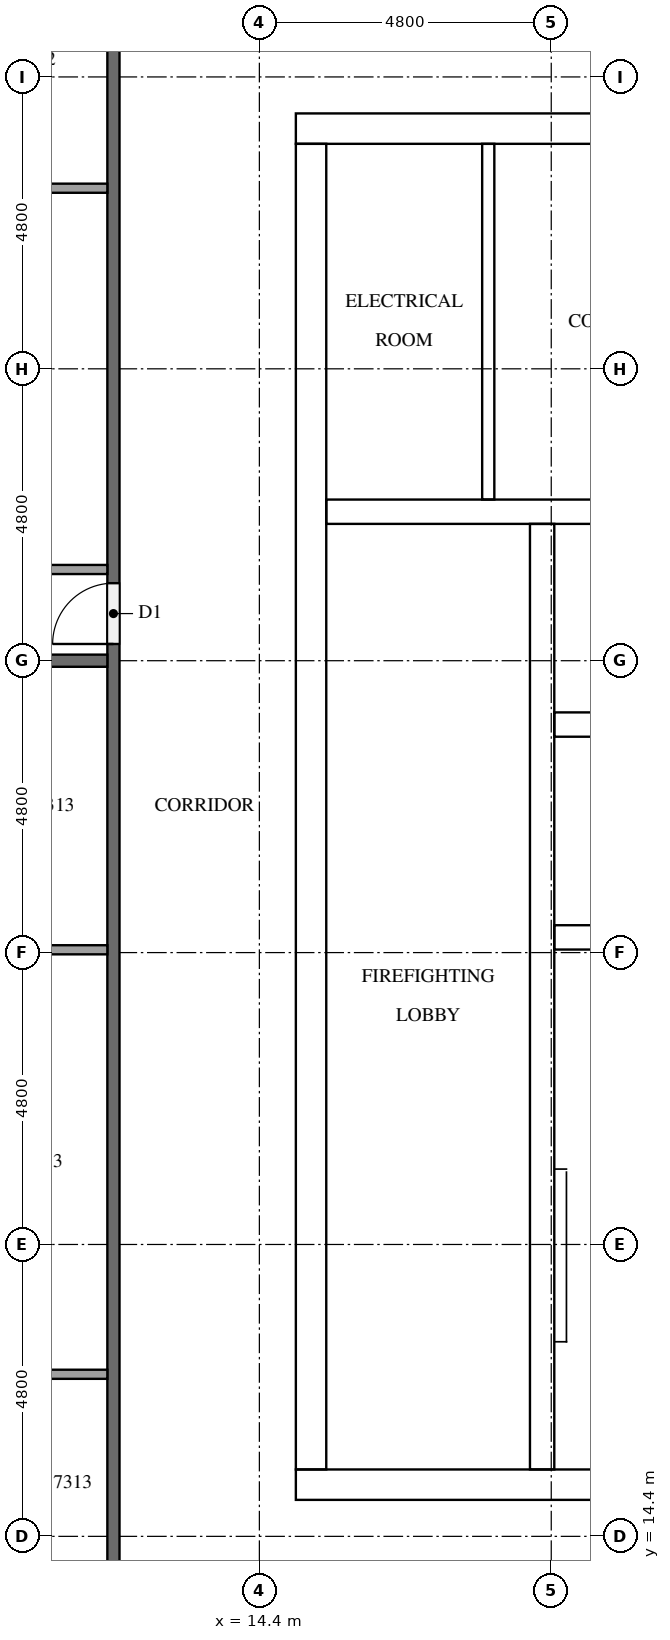
"""IFC4 building model, lengths in metres.
Left out: names, types, materials, properties, quantities, classifications, styles, units other than length and angle.
Written with IfcOpenShell. Run it as: python <this file> out.ifc"""

import sys

from ifc_helpers import new_model, si_unit, direction, frame, frame_2d, origin, place, context, subcontext, project, spatial, rectangle, extrude, element, fill, save


model = new_model("IFC4")
c1 = context("Model", 3, precision=1e-05, world=origin(), true_north=direction((0.0, 1.0)))
c2 = subcontext(c1, "Body", "Model", "MODEL_VIEW")
j1 = project(units=[si_unit("LENGTHUNIT", "METRE"), si_unit("PLANEANGLEUNIT", "RADIAN")], contexts=[c1])
p1 = place(None, origin())
s1 = spatial("IfcSite", under=j1, at=p1, CompositionType="ELEMENT")
p2 = place(p1, origin())
s2 = spatial("IfcBuilding", under=s1, at=p2, CompositionType="ELEMENT")
p3 = place(p2, frame((0.0, 0.0, 279.1)))
s3 = spatial("IfcBuildingStorey", under=s2, at=p3, CompositionType="ELEMENT", Elevation=279.1)
p4 = place(p3, frame((15.0, 15.25, 0.0), z_axis=(0.0, 0.0, 1.0), x_axis=(1.0, 0.0, 0.0)))
e1 = element("IfcWall", 1, at=p4, inside=s3, PredefinedType="SHEAR", context=c2, shape_type="SweptSolid", body=[
    extrude(rectangle(XDim=32.4, YDim=0.5, at=frame_2d((16.2, 0.0))), origin(), (0.0, 0.0, 1.0), 3.2),
])
p5 = place(p4, frame((15.3, 0.0, 0.0)))
e2 = element("IfcOpeningElement", 2, at=p5, cuts=e1, PredefinedType="OPENING", context=c2, shape_type="SweptSolid", body=[
    extrude(rectangle(XDim=1.8, YDim=2.1, at=frame_2d((0.9, 1.05))), frame((0.0, 0.26, 0.0), z_axis=(0.0, -1.0, 0.0), x_axis=(1.0, 0.0, 0.0)), (0.0, 0.0, 1.0), 0.52),
])
p6 = place(p3, frame((15.0, 37.55, 0.0), z_axis=(0.0, 0.0, 1.0), x_axis=(1.0, 0.0, 0.0)))
e3 = element("IfcWall", 3, at=p6, inside=s3, PredefinedType="SHEAR", context=c2, shape_type="SweptSolid", body=[
    extrude(rectangle(XDim=32.4, YDim=0.5, at=frame_2d((16.2, 0.0))), origin(), (0.0, 0.0, 1.0), 3.2),
])
p7 = place(p6, frame((15.3, 0.0, 0.0)))
e4 = element("IfcOpeningElement", 4, at=p7, cuts=e3, PredefinedType="OPENING", context=c2, shape_type="SweptSolid", body=[
    extrude(rectangle(XDim=1.8, YDim=2.1, at=frame_2d((0.9, 1.05))), frame((0.0, 0.26, 0.0), z_axis=(0.0, -1.0, 0.0), x_axis=(1.0, 0.0, 0.0)), (0.0, 0.0, 1.0), 0.52),
])
p8 = place(p6, frame((1.282, 0.0, 0.0)))
e5 = element("IfcOpeningElement", 5, at=p8, cuts=e3, PredefinedType="OPENING", context=c2, shape_type="SweptSolid", body=[
    extrude(rectangle(XDim=1.0, YDim=2.1, at=frame_2d((0.5, 1.05))), frame((0.0, 0.26, 0.0), z_axis=(0.0, -1.0, 0.0), x_axis=(1.0, 0.0, 0.0)), (0.0, 0.0, 1.0), 0.52),
])
p9 = place(p6, frame((5.082, 0.0, 0.0)))
e6 = element("IfcOpeningElement", 6, at=p9, cuts=e3, PredefinedType="OPENING", context=c2, shape_type="SweptSolid", body=[
    extrude(rectangle(XDim=1.0, YDim=2.1, at=frame_2d((0.5, 1.05))), frame((0.0, 0.26, 0.0), z_axis=(0.0, -1.0, 0.0), x_axis=(1.0, 0.0, 0.0)), (0.0, 0.0, 1.0), 0.52),
])
p10 = place(p3, frame((15.25, 15.5, 0.0), z_axis=(0.0, 0.0, 1.0), x_axis=(0.0, 1.0, 0.0)))
e7 = element("IfcWall", 7, at=p10, inside=s3, PredefinedType="SHEAR", context=c2, shape_type="SweptSolid", body=[
    extrude(rectangle(XDim=21.8, YDim=0.5, at=frame_2d((10.9, 0.0))), origin(), (0.0, 0.0, 1.0), 3.2),
])
p11 = place(p10, frame((5.26, 0.0, 0.0)))
e8 = element("IfcOpeningElement", 8, at=p11, cuts=e7, PredefinedType="OPENING", context=c2, shape_type="SweptSolid", body=[
    extrude(rectangle(XDim=1.2, YDim=2.1, at=frame_2d((0.6, 1.05))), frame((0.0, 0.26, 0.0), z_axis=(0.0, -1.0, 0.0), x_axis=(1.0, 0.0, 0.0)), (0.0, 0.0, 1.0), 0.52),
])
p12 = place(p3, frame((19.05, 15.5, 0.0), z_axis=(0.0, 0.0, 1.0), x_axis=(0.0, 1.0, 0.0)))
e9 = element("IfcWall", 9, at=p12, inside=s3, PredefinedType="SHEAR", context=c2, shape_type="SweptSolid", body=[
    extrude(rectangle(XDim=15.55, YDim=0.4, at=frame_2d((7.775, 0.0))), origin(), (0.0, 0.0, 1.0), 3.2),
])
p13 = place(p12, frame((9.95, 0.0, 0.0)))
e10 = element("IfcOpeningElement", 10, at=p13, cuts=e9, PredefinedType="OPENING", context=c2, shape_type="SweptSolid", body=[
    extrude(rectangle(XDim=1.1, YDim=2.1, at=frame_2d((0.55, 1.05))), frame((0.0, 0.21, 0.0), z_axis=(0.0, -1.0, 0.0), x_axis=(1.0, 0.0, 0.0)), (0.0, 0.0, 1.0), 0.42),
])
p14 = place(p12, frame((13.45, 0.0, 0.0)))
e11 = element("IfcOpeningElement", 11, at=p14, cuts=e9, PredefinedType="OPENING", context=c2, shape_type="SweptSolid", body=[
    extrude(rectangle(XDim=1.1, YDim=2.1, at=frame_2d((0.55, 1.05))), frame((0.0, 0.21, 0.0), z_axis=(0.0, -1.0, 0.0), x_axis=(1.0, 0.0, 0.0)), (0.0, 0.0, 1.0), 0.42),
])
p15 = place(p12, frame((0.7, 0.0, 0.0)))
e12 = element("IfcOpeningElement", 12, at=p15, cuts=e9, PredefinedType="OPENING", context=c2, shape_type="SweptSolid", body=[
    extrude(rectangle(XDim=1.2, YDim=2.1, at=frame_2d((0.6, 1.05))), frame((0.0, 0.21, 0.0), z_axis=(0.0, -1.0, 0.0), x_axis=(1.0, 0.0, 0.0)), (0.0, 0.0, 1.0), 0.42),
])
for number, where, z_axis, x_axis in (
    (13, (19.25, 24.25, 0.0), (0.0, 0.0, 1.0), (1.0, 0.0, 0.0)),
    (14, (19.25, 27.75, 0.0), (0.0, 0.0, 1.0), (1.0, 0.0, 0.0)),
):
    element("IfcWall", number, at=place(p3, frame(where, z_axis=z_axis, x_axis=x_axis)), inside=s3, PredefinedType="SHEAR", context=c2, shape_type="SweptSolid", body=[
        extrude(rectangle(XDim=3.65, YDim=0.4, at=frame_2d((1.825, 0.0))), origin(), (0.0, 0.0, 1.0), 3.2),
    ])
p16 = place(p3, frame((15.5, 31.25, 0.0), z_axis=(0.0, 0.0, 1.0), x_axis=(1.0, 0.0, 0.0)))
e15 = element("IfcWall", 15, at=p16, inside=s3, PredefinedType="SHEAR", context=c2, shape_type="SweptSolid", body=[
    extrude(rectangle(XDim=7.4, YDim=0.4, at=frame_2d((3.7, 0.0))), origin(), (0.0, 0.0, 1.0), 3.2),
])
p17 = place(p3, frame((18.164, 31.45, 0.0), z_axis=(0.0, 0.0, 1.0), x_axis=(0.0, 1.0, 0.0)))
e16 = element("IfcWall", 16, at=p17, inside=s3, PredefinedType="PARTITIONING", context=c2, shape_type="SweptSolid", body=[
    extrude(rectangle(XDim=5.85, YDim=0.2, at=frame_2d((2.925, 0.0))), origin(), (0.0, 0.0, 1.0), 3.2),
])
p18 = place(p3, frame((12.0, 12.1, 0.0), z_axis=(0.0, 0.0, 1.0), x_axis=(0.0, 1.0, 0.0)))
e17 = element("IfcWall", 17, at=p18, inside=s3, PredefinedType="PARTITIONING", context=c2, shape_type="SweptSolid", body=[
    extrude(rectangle(XDim=28.6, YDim=0.2, at=frame_2d((14.3, 0.0))), origin(), (0.0, 0.0, 1.0), 3.2),
])
p19 = place(p18, frame((16.975, 0.0, 0.0)))
e18 = element("IfcOpeningElement", 18, at=p19, cuts=e17, PredefinedType="OPENING", context=c2, shape_type="SweptSolid", body=[
    extrude(rectangle(XDim=1.0, YDim=2.1, at=frame_2d((0.5, 1.05))), frame((0.0, 0.11, 0.0), z_axis=(0.0, -1.0, 0.0), x_axis=(1.0, 0.0, 0.0)), (0.0, 0.0, 1.0), 0.22),
])
p20 = place(p18, frame((0.175, 0.0, 0.0)))
e19 = element("IfcOpeningElement", 19, at=p20, cuts=e17, PredefinedType="OPENING", context=c2, shape_type="SweptSolid", body=[
    extrude(rectangle(XDim=1.0, YDim=2.1, at=frame_2d((0.5, 1.05))), frame((0.0, 0.11, 0.0), z_axis=(0.0, -1.0, 0.0), x_axis=(1.0, 0.0, 0.0)), (0.0, 0.0, 1.0), 0.22),
])
p21 = place(p3, frame((0.1, 28.8, 0.0), z_axis=(0.0, 0.0, 1.0), x_axis=(1.0, 0.0, 0.0)))
e20 = element("IfcWall", 20, at=p21, inside=s3, PredefinedType="PARTITIONING", context=c2, shape_type="SweptSolid", body=[
    extrude(rectangle(XDim=11.8, YDim=0.2, at=frame_2d((5.9, 0.0))), origin(), (0.0, 0.0, 1.0), 3.2),
])
p22 = place(p3, frame((11.9, 36.57, 0.0), z_axis=(0.0, 0.0, 1.0), x_axis=(-1.0, 0.0, 0.0)))
e21 = element("IfcWall", 21, at=p22, inside=s3, PredefinedType="PARTITIONING", context=c2, shape_type="SweptSolid", body=[
    extrude(rectangle(XDim=4.175, YDim=0.15, at=frame_2d((2.087, 0.0))), origin(), (0.0, 0.0, 1.0), 3.2),
])
p23 = place(p3, frame((11.9, 30.3, 0.0), z_axis=(0.0, 0.0, 1.0), x_axis=(-1.0, 0.0, 0.0)))
e22 = element("IfcWall", 22, at=p23, inside=s3, PredefinedType="PARTITIONING", context=c2, shape_type="SweptSolid", body=[
    extrude(rectangle(XDim=4.325, YDim=0.15, at=frame_2d((2.163, 0.0))), origin(), (0.0, 0.0, 1.0), 3.2),
])
for number, where, z_axis, x_axis in (
    (23, (11.9, 17.065, 0.0), (0.0, 0.0, 1.0), (-1.0, 0.0, 0.0)),
    (24, (11.9, 24.046, 0.0), (0.0, 0.0, 1.0), (-1.0, 0.0, 0.0)),
):
    element("IfcWall", number, at=place(p3, frame(where, z_axis=z_axis, x_axis=x_axis)), inside=s3, PredefinedType="PARTITIONING", context=c2, shape_type="SweptSolid", body=[
        extrude(rectangle(XDim=3.575, YDim=0.15, at=frame_2d((1.788, 0.0))), origin(), (0.0, 0.0, 1.0), 3.2),
    ])
p24 = place(p13, origin())
e25 = element("IfcDoor", 25, at=p24, inside=s3, OperationType="DOUBLE_DOOR_SLIDING", PredefinedType="DOOR", context=c2, shape_type="SweptSolid", body=[
    extrude(rectangle(XDim=1.1, YDim=2.1, at=frame_2d((0.55, 1.05))), frame((0.0, 0.025, 0.0), z_axis=(0.0, -1.0, 0.0), x_axis=(1.0, 0.0, 0.0)), (0.0, 0.0, 1.0), 0.05),
])
fill(e10, e25)
p25 = place(p14, origin())
e26 = element("IfcDoor", 26, at=p25, inside=s3, OperationType="DOUBLE_DOOR_SLIDING", PredefinedType="DOOR", context=c2, shape_type="SweptSolid", body=[
    extrude(rectangle(XDim=1.1, YDim=2.1, at=frame_2d((0.55, 1.05))), frame((0.0, 0.025, 0.0), z_axis=(0.0, -1.0, 0.0), x_axis=(1.0, 0.0, 0.0)), (0.0, 0.0, 1.0), 0.05),
])
fill(e11, e26)
p26 = place(p15, frame((1.2, 0.0, 0.0), z_axis=(0.0, 0.0, 1.0), x_axis=(-1.0, 0.0, 0.0)))
e27 = element("IfcDoor", 27, at=p26, inside=s3, OperationType="SINGLE_SWING_LEFT", PredefinedType="DOOR", context=c2, shape_type="SweptSolid", body=[
    extrude(rectangle(XDim=1.2, YDim=2.1, at=frame_2d((0.6, 1.05))), frame((0.0, 0.025, 0.0), z_axis=(0.0, -1.0, 0.0), x_axis=(1.0, 0.0, 0.0)), (0.0, 0.0, 1.0), 0.05),
])
fill(e12, e27)
p27 = place(p11, frame((1.2, 0.0, 0.0), z_axis=(0.0, 0.0, 1.0), x_axis=(-1.0, 0.0, 0.0)))
e28 = element("IfcDoor", 28, at=p27, inside=s3, OperationType="SINGLE_SWING_RIGHT", PredefinedType="DOOR", context=c2, shape_type="SweptSolid", body=[
    extrude(rectangle(XDim=1.2, YDim=2.1, at=frame_2d((0.6, 1.05))), frame((0.0, 0.025, 0.0), z_axis=(0.0, -1.0, 0.0), x_axis=(1.0, 0.0, 0.0)), (0.0, 0.0, 1.0), 0.05),
])
fill(e8, e28)
p28 = place(p8, origin())
e29 = element("IfcDoor", 29, at=p28, inside=s3, OperationType="SINGLE_SWING_RIGHT", PredefinedType="DOOR", context=c2, shape_type="SweptSolid", body=[
    extrude(rectangle(XDim=1.0, YDim=2.1, at=frame_2d((0.5, 1.05))), frame((0.0, 0.025, 0.0), z_axis=(0.0, -1.0, 0.0), x_axis=(1.0, 0.0, 0.0)), (0.0, 0.0, 1.0), 0.05),
])
fill(e5, e29)
p29 = place(p19, origin())
e30 = element("IfcDoor", 30, at=p29, inside=s3, OperationType="SINGLE_SWING_LEFT", PredefinedType="DOOR", context=c2, shape_type="SweptSolid", body=[
    extrude(rectangle(XDim=1.0, YDim=2.1, at=frame_2d((0.5, 1.05))), frame((0.0, 0.025, 0.0), z_axis=(0.0, -1.0, 0.0), x_axis=(1.0, 0.0, 0.0)), (0.0, 0.0, 1.0), 0.05),
])
fill(e18, e30)
save(model, sys.argv[1])
